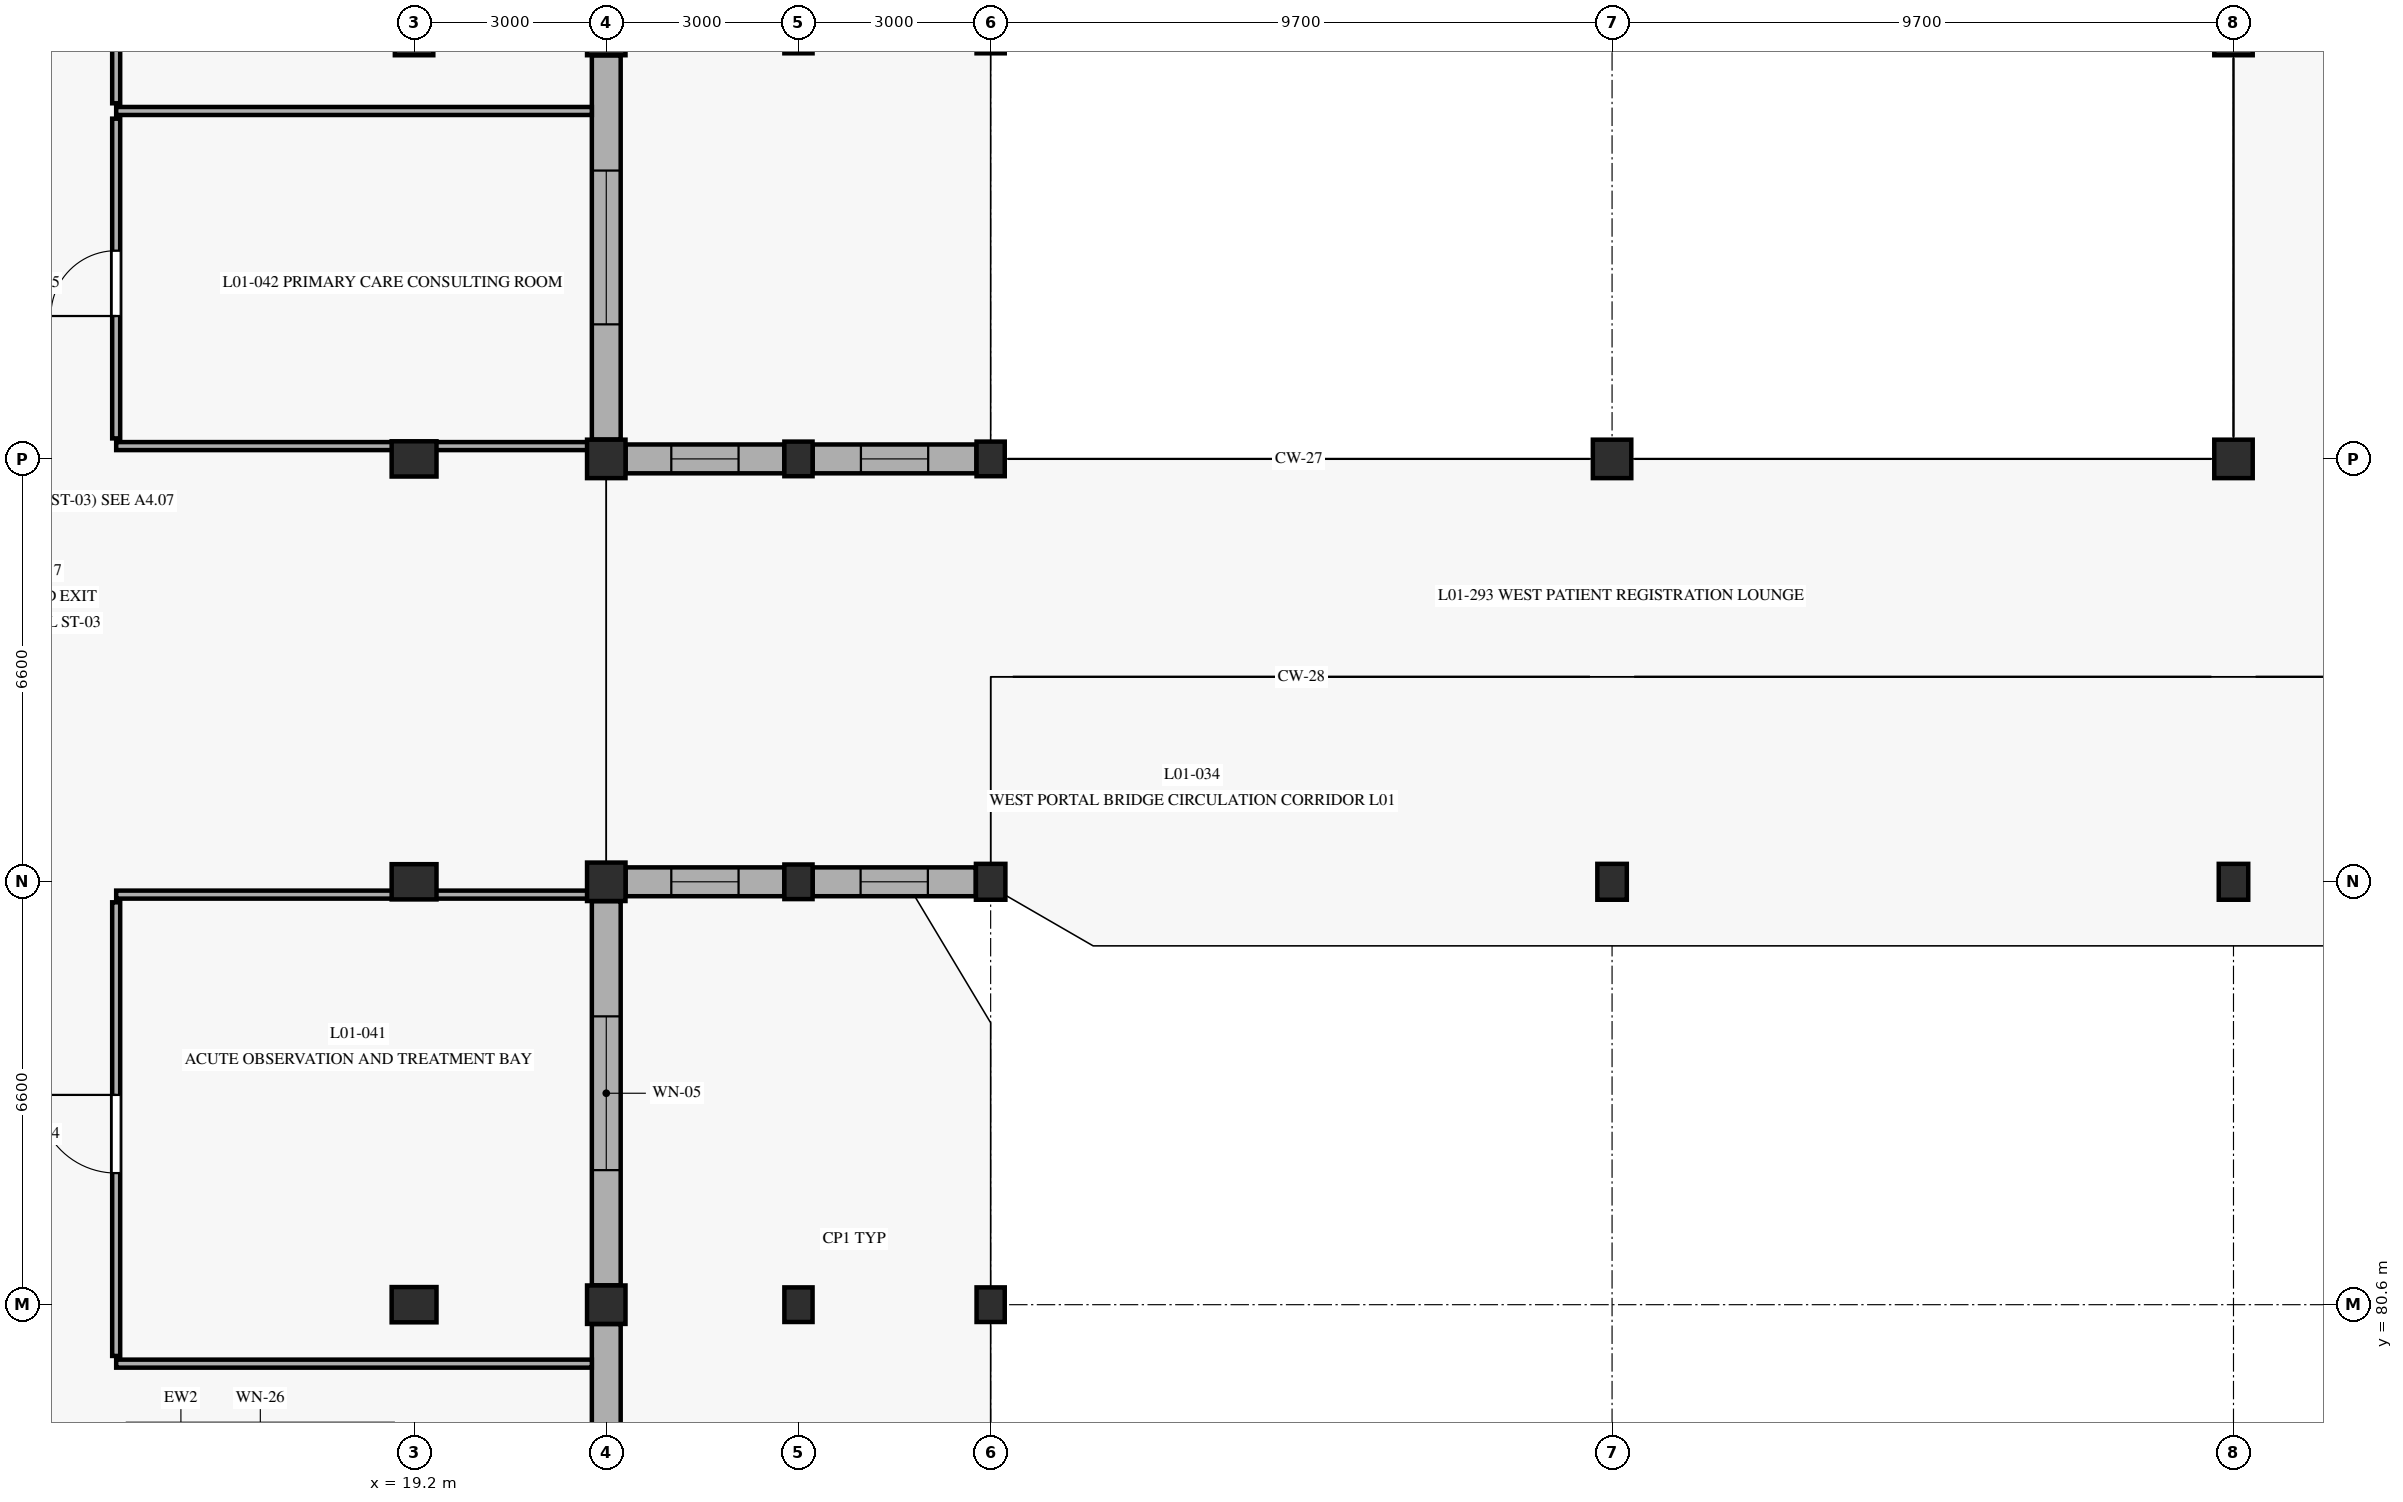
"""IFC4 building model, lengths in metres.
Left out: names, types, materials, properties, quantities, classifications, styles, units other than length and angle.
Written with IfcOpenShell. Run it as: python <this file> out.ifc"""

import sys

from ifc_helpers import new_model, si_unit, direction, frame, frame_2d, origin, origin_with_axes, origin_2d, place, context, subcontext, project, spatial, rectangle, extrude, element, fill, save


model = new_model("IFC4")
c1 = context("Model", 3, precision=1e-05, world=origin(), true_north=direction((0.0, 1.0)))
c2 = subcontext(c1, "Body", "Model", "MODEL_VIEW")
j1 = project(units=[si_unit("LENGTHUNIT", "METRE"), si_unit("PLANEANGLEUNIT", "RADIAN")], contexts=[c1])
p1 = place(None, origin())
s1 = spatial("IfcSite", under=j1, at=p1, CompositionType="ELEMENT")
p2 = place(p1, origin())
s2 = spatial("IfcBuilding", under=s1, at=p2, CompositionType="ELEMENT")
p3 = place(p2, origin())
s3 = spatial("IfcBuildingStorey", under=s2, at=p3, CompositionType="ELEMENT", Elevation=0.0)
for number, where, z_axis, x_axis in (
    (1, (19.2, 80.6, 0.0), (0.0, 0.0, 1.0), (1.0, 0.0, 0.0)),
    (2, (19.2, 87.2, 0.0), (0.0, 0.0, 1.0), (1.0, 0.0, 0.0)),
    (3, (19.2, 93.8, 0.0), (0.0, 0.0, 1.0), (1.0, 0.0, 0.0)),
):
    element("IfcColumn", number, at=place(p3, frame(where, z_axis=z_axis, x_axis=x_axis)), inside=s3, PredefinedType="COLUMN", context=c2, shape_type="SweptSolid", body=[
        extrude(rectangle(XDim=0.7, YDim=0.55, at=origin_2d()), origin(), (0.0, 0.0, 1.0), 4.8),
    ])
for number, where, z_axis, x_axis in (
    (4, (19.2, 100.4, 0.0), (0.0, 0.0, 1.0), (1.0, 0.0, 0.0)),
    (5, (22.2, 80.6, 0.0), (0.0, 0.0, 1.0), (1.0, 0.0, 0.0)),
    (6, (22.2, 87.2, 0.0), (0.0, 0.0, 1.0), (1.0, 0.0, 0.0)),
    (7, (22.2, 93.8, 0.0), (0.0, 0.0, 1.0), (1.0, 0.0, 0.0)),
    (8, (22.2, 100.4, 0.0), (0.0, 0.0, 1.0), (1.0, 0.0, 0.0)),
):
    element("IfcColumn", number, at=place(p3, frame(where, z_axis=z_axis, x_axis=x_axis)), inside=s3, PredefinedType="COLUMN", context=c2, shape_type="SweptSolid", body=[
        extrude(rectangle(XDim=0.6, YDim=0.6, at=origin_2d()), origin(), (0.0, 0.0, 1.0), 4.8),
    ])
for number, where, z_axis, x_axis in (
    (9, (25.2, 80.6, 0.0), (0.0, 0.0, 1.0), (1.0, 0.0, 0.0)),
    (10, (25.2, 87.2, 0.0), (0.0, 0.0, 1.0), (1.0, 0.0, 0.0)),
    (11, (25.2, 93.8, 0.0), (0.0, 0.0, 1.0), (1.0, 0.0, 0.0)),
    (12, (25.2, 100.4, 0.0), (0.0, 0.0, 1.0), (1.0, 0.0, 0.0)),
    (13, (28.2, 80.6, 0.0), (0.0, 0.0, 1.0), (1.0, 0.0, 0.0)),
):
    element("IfcColumn", number, at=place(p3, frame(where, z_axis=z_axis, x_axis=x_axis)), inside=s3, PredefinedType="PILASTER", context=c2, shape_type="SweptSolid", body=[
        extrude(rectangle(XDim=0.44, YDim=0.54, at=origin_2d()), origin(), (0.0, 0.0, 1.0), 4.8),
    ])
p4 = place(p3, frame((28.2, 87.2, 0.0), z_axis=(0.0, 0.0, 1.0), x_axis=(1.0, 0.0, 0.0)))
e14 = element("IfcColumn", 14, at=p4, inside=s3, PredefinedType="COLUMN", context=c2, shape_type="SweptSolid", body=[
    extrude(rectangle(XDim=0.46, YDim=0.56, at=origin_2d()), origin(), (0.0, 0.0, 1.0), 4.8),
])
for number, where, z_axis, x_axis in (
    (15, (28.2, 93.8, 0.0), (0.0, 0.0, 1.0), (1.0, 0.0, 0.0)),
    (16, (28.2, 100.4, 0.0), (0.0, 0.0, 1.0), (1.0, 0.0, 0.0)),
):
    element("IfcColumn", number, at=place(p3, frame(where, z_axis=z_axis, x_axis=x_axis)), inside=s3, PredefinedType="PILASTER", context=c2, shape_type="SweptSolid", body=[
        extrude(rectangle(XDim=0.44, YDim=0.54, at=origin_2d()), origin(), (0.0, 0.0, 1.0), 4.8),
    ])
p5 = place(p3, frame((37.9, 87.2, 0.0), z_axis=(0.0, 0.0, 1.0), x_axis=(1.0, 0.0, 0.0)))
e17 = element("IfcColumn", 17, at=p5, inside=s3, PredefinedType="COLUMN", context=c2, shape_type="SweptSolid", body=[
    extrude(rectangle(XDim=0.46, YDim=0.56, at=origin_2d()), origin(), (0.0, 0.0, 1.0), 4.8),
])
p6 = place(p3, frame((37.9, 93.8, 0.0), z_axis=(0.0, 0.0, 1.0), x_axis=(1.0, 0.0, 0.0)))
e18 = element("IfcColumn", 18, at=p6, inside=s3, PredefinedType="COLUMN", context=c2, shape_type="SweptSolid", body=[
    extrude(rectangle(XDim=0.6, YDim=0.6, at=origin_2d()), origin(), (0.0, 0.0, 1.0), 4.8),
])
p7 = place(p3, frame((47.6, 87.2, 0.0), z_axis=(0.0, 0.0, 1.0), x_axis=(1.0, 0.0, 0.0)))
e19 = element("IfcColumn", 19, at=p7, inside=s3, PredefinedType="COLUMN", context=c2, shape_type="SweptSolid", body=[
    extrude(rectangle(XDim=0.46, YDim=0.56, at=origin_2d()), origin(), (0.0, 0.0, 1.0), 4.8),
])
for number, where, z_axis, x_axis in (
    (20, (47.6, 93.8, 0.0), (0.0, 0.0, 1.0), (1.0, 0.0, 0.0)),
    (21, (47.6, 100.4, 0.0), (0.0, 0.0, 1.0), (1.0, 0.0, 0.0)),
):
    element("IfcColumn", number, at=place(p3, frame(where, z_axis=z_axis, x_axis=x_axis)), inside=s3, PredefinedType="COLUMN", context=c2, shape_type="SweptSolid", body=[
        extrude(rectangle(XDim=0.6, YDim=0.6, at=origin_2d()), origin(), (0.0, 0.0, 1.0), 4.8),
    ])
p8 = place(p3, frame((22.2, 72.502, 0.0), z_axis=(0.0, 0.0, 1.0), x_axis=(0.0, 1.0, 0.0)))
e22 = element("IfcWall", 22, at=p8, inside=s3, PredefinedType="SOLIDWALL", context=c2, shape_type="SweptSolid", body=[
    extrude(rectangle(XDim=7.796, YDim=0.45, at=frame_2d((3.898, 0.0))), origin(), (0.0, 0.0, 1.0), 4.04),
])
p9 = place(p8, frame((2.968, 0.0, 0.0)))
e23 = element("IfcOpeningElement", 23, at=p9, cuts=e22, PredefinedType="OPENING", context=c2, shape_type="SweptSolid", body=[
    extrude(rectangle(XDim=1.86, YDim=2.5, at=frame_2d((0.93, 1.25))), frame((0.0, 0.235, 0.0), z_axis=(0.0, -1.0, 0.0), x_axis=(1.0, 0.0, 0.0)), (0.0, 0.0, 1.0), 0.47),
])
p10 = place(p3, frame((22.2, 80.902, 0.0), z_axis=(0.0, 0.0, 1.0), x_axis=(0.0, 1.0, 0.0)))
e24 = element("IfcWall", 24, at=p10, inside=s3, PredefinedType="SOLIDWALL", context=c2, shape_type="SweptSolid", body=[
    extrude(rectangle(XDim=5.996, YDim=0.45, at=frame_2d((2.998, 0.0))), origin(), (0.0, 0.0, 1.0), 3.96),
])
p11 = place(p10, frame((1.798, 0.0, 0.6)))
e25 = element("IfcOpeningElement", 25, at=p11, cuts=e24, PredefinedType="OPENING", context=c2, shape_type="SweptSolid", body=[
    extrude(rectangle(XDim=2.4, YDim=2.5, at=frame_2d((1.2, 1.25))), frame((0.0, 0.235, 0.0), z_axis=(0.0, -1.0, 0.0), x_axis=(1.0, 0.0, 0.0)), (0.0, 0.0, 1.0), 0.47),
])
p12 = place(p3, frame((22.2, 94.102, 0.0), z_axis=(0.0, 0.0, 1.0), x_axis=(0.0, 1.0, 0.0)))
e26 = element("IfcWall", 26, at=p12, inside=s3, PredefinedType="SOLIDWALL", context=c2, shape_type="SweptSolid", body=[
    extrude(rectangle(XDim=5.996, YDim=0.45, at=frame_2d((2.998, 0.0))), origin(), (0.0, 0.0, 1.0), 3.96),
])
p13 = place(p12, frame((1.798, 0.0, 0.6)))
e27 = element("IfcOpeningElement", 27, at=p13, cuts=e26, PredefinedType="OPENING", context=c2, shape_type="SweptSolid", body=[
    extrude(rectangle(XDim=2.4, YDim=2.5, at=frame_2d((1.2, 1.25))), frame((0.0, 0.235, 0.0), z_axis=(0.0, -1.0, 0.0), x_axis=(1.0, 0.0, 0.0)), (0.0, 0.0, 1.0), 0.47),
])
p14 = place(p3, frame((22.502, 87.2, 0.0), z_axis=(0.0, 0.0, 1.0), x_axis=(1.0, 0.0, 0.0)))
e28 = element("IfcWall", 28, at=p14, inside=s3, PredefinedType="SOLIDWALL", context=c2, shape_type="SweptSolid", body=[
    extrude(rectangle(XDim=2.476, YDim=0.45, at=frame_2d((1.238, 0.0))), origin(), (0.0, 0.0, 1.0), 3.87),
])
p15 = place(p14, frame((0.713, 0.0, 0.65)))
e29 = element("IfcOpeningElement", 29, at=p15, cuts=e28, PredefinedType="OPENING", context=c2, shape_type="SweptSolid", body=[
    extrude(rectangle(XDim=1.05, YDim=2.2, at=frame_2d((0.525, 1.1))), frame((0.0, 0.235, 0.0), z_axis=(0.0, -1.0, 0.0), x_axis=(1.0, 0.0, 0.0)), (0.0, 0.0, 1.0), 0.47),
])
p16 = place(p3, frame((24.978, 93.8, 0.0), z_axis=(0.0, 0.0, 1.0), x_axis=(-1.0, 0.0, 0.0)))
e30 = element("IfcWall", 30, at=p16, inside=s3, PredefinedType="SOLIDWALL", context=c2, shape_type="SweptSolid", body=[
    extrude(rectangle(XDim=2.476, YDim=0.45, at=frame_2d((1.238, 0.0))), origin(), (0.0, 0.0, 1.0), 4.06),
])
p17 = place(p16, frame((0.713, 0.0, 0.85)))
e31 = element("IfcOpeningElement", 31, at=p17, cuts=e30, PredefinedType="OPENING", context=c2, shape_type="SweptSolid", body=[
    extrude(rectangle(XDim=1.05, YDim=2.2, at=frame_2d((0.525, 1.1))), frame((0.0, 0.235, 0.0), z_axis=(0.0, -1.0, 0.0), x_axis=(1.0, 0.0, 0.0)), (0.0, 0.0, 1.0), 0.47),
])
p18 = place(p3, frame((25.422, 87.2, 0.0), z_axis=(0.0, 0.0, 1.0), x_axis=(1.0, 0.0, 0.0)))
e32 = element("IfcWall", 32, at=p18, inside=s3, PredefinedType="SOLIDWALL", context=c2, shape_type="SweptSolid", body=[
    extrude(rectangle(XDim=2.546, YDim=0.45, at=frame_2d((1.273, 0.0))), origin(), (0.0, 0.0, 1.0), 3.87),
])
p19 = place(p18, frame((0.748, 0.0, 0.65)))
e33 = element("IfcOpeningElement", 33, at=p19, cuts=e32, PredefinedType="OPENING", context=c2, shape_type="SweptSolid", body=[
    extrude(rectangle(XDim=1.05, YDim=2.2, at=frame_2d((0.525, 1.1))), frame((0.0, 0.235, 0.0), z_axis=(0.0, -1.0, 0.0), x_axis=(1.0, 0.0, 0.0)), (0.0, 0.0, 1.0), 0.47),
])
p20 = place(p3, frame((27.978, 93.8, 0.0), z_axis=(0.0, 0.0, 1.0), x_axis=(-1.0, 0.0, 0.0)))
e34 = element("IfcWall", 34, at=p20, inside=s3, PredefinedType="SOLIDWALL", context=c2, shape_type="SweptSolid", body=[
    extrude(rectangle(XDim=2.556, YDim=0.45, at=frame_2d((1.278, 0.0))), origin(), (0.0, 0.0, 1.0), 4.06),
])
p21 = place(p20, frame((0.753, 0.0, 0.85)))
e35 = element("IfcOpeningElement", 35, at=p21, cuts=e34, PredefinedType="OPENING", context=c2, shape_type="SweptSolid", body=[
    extrude(rectangle(XDim=1.05, YDim=2.2, at=frame_2d((0.525, 1.1))), frame((0.0, 0.235, 0.0), z_axis=(0.0, -1.0, 0.0), x_axis=(1.0, 0.0, 0.0)), (0.0, 0.0, 1.0), 0.47),
])
p22 = place(p3, frame((14.55, 79.8, 0.0), z_axis=(0.0, 0.0, 1.0), x_axis=(0.0, 1.0, 0.0)))
e36 = element("IfcWall", 36, at=p22, inside=s3, PredefinedType="PARTITIONING", context=c2, shape_type="SweptSolid", body=[
    extrude(rectangle(XDim=7.08, YDim=0.125, at=frame_2d((3.54, 0.0))), origin(), (0.0, 0.0, 1.0), 3.865),
])
p23 = place(p22, frame((2.854, 0.0, 0.0)))
e37 = element("IfcOpeningElement", 37, at=p23, cuts=e36, PredefinedType="OPENING", context=c2, shape_type="SweptSolid", body=[
    extrude(rectangle(XDim=1.22, YDim=2.2, at=frame_2d((0.61, 1.1))), frame((0.0, 0.073, 0.0), z_axis=(0.0, -1.0, 0.0), x_axis=(1.0, 0.0, 0.0)), (0.0, 0.0, 1.0), 0.145),
])
p24 = place(p3, frame((14.55, 79.68, 0.0), z_axis=(0.0, 0.0, 1.0), x_axis=(1.0, 0.0, 0.0)))
e38 = element("IfcWall", 38, at=p24, inside=s3, PredefinedType="PARTITIONING", context=c2, shape_type="SweptSolid", body=[
    extrude(rectangle(XDim=7.425, YDim=0.125, at=frame_2d((3.712, 0.0))), origin(), (0.0, 0.0, 1.0), 3.895),
])
p25 = place(p3, frame((14.55, 87.0, 0.0), z_axis=(0.0, 0.0, 1.0), x_axis=(1.0, 0.0, 0.0)))
e39 = element("IfcWall", 39, at=p25, inside=s3, PredefinedType="PARTITIONING", context=c2, shape_type="SweptSolid", body=[
    extrude(rectangle(XDim=7.425, YDim=0.125, at=frame_2d((3.712, 0.0))), origin(), (0.0, 0.0, 1.0), 3.865),
])
p26 = place(p3, frame((14.55, 94.12, 0.0), z_axis=(0.0, 0.0, 1.0), x_axis=(0.0, 1.0, 0.0)))
e40 = element("IfcWall", 40, at=p26, inside=s3, PredefinedType="PARTITIONING", context=c2, shape_type="SweptSolid", body=[
    extrude(rectangle(XDim=4.99, YDim=0.125, at=frame_2d((2.495, 0.0))), origin(), (0.0, 0.0, 1.0), 4.015),
])
p27 = place(p26, frame((1.91, 0.0, 0.0)))
e41 = element("IfcOpeningElement", 41, at=p27, cuts=e40, PredefinedType="OPENING", context=c2, shape_type="SweptSolid", body=[
    extrude(rectangle(XDim=1.02, YDim=2.18, at=frame_2d((0.51, 1.09))), frame((0.0, 0.073, 0.0), z_axis=(0.0, -1.0, 0.0), x_axis=(1.0, 0.0, 0.0)), (0.0, 0.0, 1.0), 0.145),
])
for number, where, z_axis, x_axis in (
    (42, (14.55, 94.0, 0.0), (0.0, 0.0, 1.0), (1.0, 0.0, 0.0)),
    (43, (14.55, 99.23, 0.0), (0.0, 0.0, 1.0), (1.0, 0.0, 0.0)),
):
    element("IfcWall", number, at=place(p3, frame(where, z_axis=z_axis, x_axis=x_axis)), inside=s3, PredefinedType="PARTITIONING", context=c2, shape_type="SweptSolid", body=[
        extrude(rectangle(XDim=7.425, YDim=0.125, at=frame_2d((3.712, 0.0))), origin(), (0.0, 0.0, 1.0), 3.895),
    ])
p28 = place(p3, frame((14.55, 99.35, 0.0), z_axis=(0.0, 0.0, 1.0), x_axis=(0.0, 1.0, 0.0)))
e44 = element("IfcWall", 44, at=p28, inside=s3, PredefinedType="PARTITIONING", context=c2, shape_type="SweptSolid", body=[
    extrude(rectangle(XDim=6.5, YDim=0.125, at=frame_2d((3.25, 0.0))), origin(), (0.0, 0.0, 1.0), 4.015),
])
p29 = place(p28, frame((2.723, 0.0, 0.0)))
e45 = element("IfcOpeningElement", 45, at=p29, cuts=e44, PredefinedType="OPENING", context=c2, shape_type="SweptSolid", body=[
    extrude(rectangle(XDim=0.9, YDim=2.12, at=frame_2d((0.45, 1.06))), frame((0.0, 0.073, 0.0), z_axis=(0.0, -1.0, 0.0), x_axis=(1.0, 0.0, 0.0)), (0.0, 0.0, 1.0), 0.145),
])
p30 = place(p28, frame((3.975, 0.0, 1.05)))
e46 = element("IfcOpeningElement", 46, at=p30, cuts=e44, PredefinedType="OPENING", context=c2, shape_type="SweptSolid", body=[
    extrude(rectangle(XDim=1.8, YDim=1.25, at=frame_2d((0.9, 0.625))), frame((0.0, 0.073, 0.0), z_axis=(0.0, -1.0, 0.0), x_axis=(1.0, 0.0, 0.0)), (0.0, 0.0, 1.0), 0.145),
])
p31 = place(p11, origin_with_axes())
e47 = element("IfcWindow", 47, at=p31, inside=s3, PartitioningType="SINGLE_PANEL", PredefinedType="WINDOW", context=c2, shape_type="SweptSolid", body=[
    extrude(rectangle(XDim=2.4, YDim=2.5, at=frame_2d((1.2, 1.25))), frame((0.0, 0.03, 0.0), z_axis=(0.0, -1.0, 0.0), x_axis=(1.0, 0.0, 0.0)), (0.0, 0.0, 1.0), 0.06),
])
fill(e25, e47)
p32 = place(p13, origin_with_axes())
e48 = element("IfcWindow", 48, at=p32, inside=s3, PartitioningType="SINGLE_PANEL", PredefinedType="WINDOW", context=c2, shape_type="SweptSolid", body=[
    extrude(rectangle(XDim=2.4, YDim=2.5, at=frame_2d((1.2, 1.25))), frame((0.0, 0.03, 0.0), z_axis=(0.0, -1.0, 0.0), x_axis=(1.0, 0.0, 0.0)), (0.0, 0.0, 1.0), 0.06),
])
fill(e27, e48)
p33 = place(p15, origin_with_axes())
e49 = element("IfcWindow", 49, at=p33, inside=s3, PartitioningType="SINGLE_PANEL", PredefinedType="WINDOW", context=c2, shape_type="SweptSolid", body=[
    extrude(rectangle(XDim=1.05, YDim=2.2, at=frame_2d((0.525, 1.1))), frame((0.0, 0.03, 0.0), z_axis=(0.0, -1.0, 0.0), x_axis=(1.0, 0.0, 0.0)), (0.0, 0.0, 1.0), 0.06),
])
fill(e29, e49)
p34 = place(p17, origin_with_axes())
e50 = element("IfcWindow", 50, at=p34, inside=s3, PartitioningType="SINGLE_PANEL", PredefinedType="WINDOW", context=c2, shape_type="SweptSolid", body=[
    extrude(rectangle(XDim=1.05, YDim=2.2, at=frame_2d((0.525, 1.1))), frame((0.0, 0.03, 0.0), z_axis=(0.0, -1.0, 0.0), x_axis=(1.0, 0.0, 0.0)), (0.0, 0.0, 1.0), 0.06),
])
fill(e31, e50)
p35 = place(p19, origin_with_axes())
e51 = element("IfcWindow", 51, at=p35, inside=s3, PartitioningType="SINGLE_PANEL", PredefinedType="WINDOW", context=c2, shape_type="SweptSolid", body=[
    extrude(rectangle(XDim=1.05, YDim=2.2, at=frame_2d((0.525, 1.1))), frame((0.0, 0.03, 0.0), z_axis=(0.0, -1.0, 0.0), x_axis=(1.0, 0.0, 0.0)), (0.0, 0.0, 1.0), 0.06),
])
fill(e33, e51)
p36 = place(p21, origin_with_axes())
e52 = element("IfcWindow", 52, at=p36, inside=s3, PartitioningType="SINGLE_PANEL", PredefinedType="WINDOW", context=c2, shape_type="SweptSolid", body=[
    extrude(rectangle(XDim=1.05, YDim=2.2, at=frame_2d((0.525, 1.1))), frame((0.0, 0.03, 0.0), z_axis=(0.0, -1.0, 0.0), x_axis=(1.0, 0.0, 0.0)), (0.0, 0.0, 1.0), 0.06),
])
fill(e35, e52)
p37 = place(p23, frame((1.22, 0.0, 0.0), z_axis=(0.0, 0.0, 1.0), x_axis=(-1.0, 0.0, 0.0)))
e53 = element("IfcDoor", 53, at=p37, inside=s3, OperationType="SINGLE_SWING_LEFT", PredefinedType="DOOR", context=c2, shape_type="SweptSolid", body=[
    extrude(rectangle(XDim=1.22, YDim=2.2, at=frame_2d((0.61, 1.1))), frame((0.0, 0.025, 0.0), z_axis=(0.0, -1.0, 0.0), x_axis=(1.0, 0.0, 0.0)), (0.0, 0.0, 1.0), 0.05),
])
fill(e37, e53)
p38 = place(p27, frame((1.02, 0.0, 0.0), z_axis=(0.0, 0.0, 1.0), x_axis=(-1.0, 0.0, 0.0)))
e54 = element("IfcDoor", 54, at=p38, inside=s3, OperationType="SINGLE_SWING_RIGHT", PredefinedType="DOOR", context=c2, shape_type="SweptSolid", body=[
    extrude(rectangle(XDim=1.02, YDim=2.18, at=frame_2d((0.51, 1.09))), frame((0.0, 0.025, 0.0), z_axis=(0.0, -1.0, 0.0), x_axis=(1.0, 0.0, 0.0)), (0.0, 0.0, 1.0), 0.05),
])
fill(e41, e54)
save(model, sys.argv[1])
